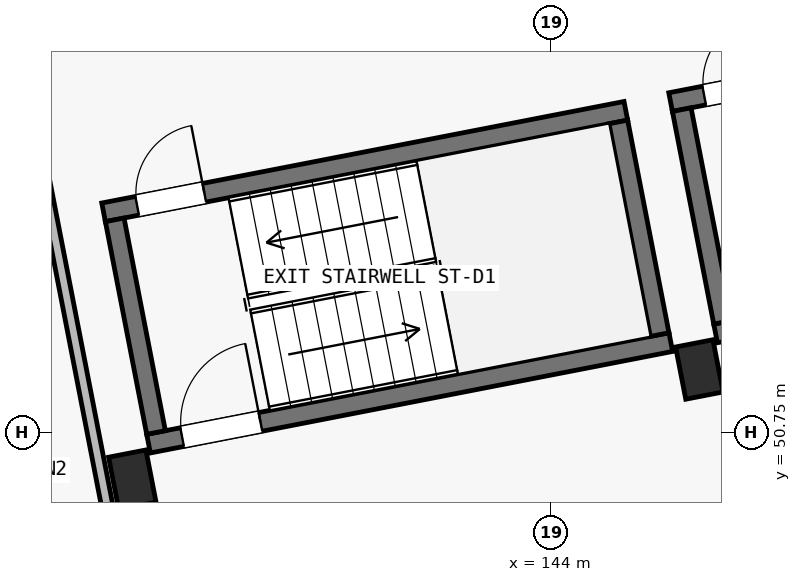
"""IFC4 building model, lengths in metres.
Left out: names, types, materials, properties, quantities, classifications, styles, units other than length and angle.
Written with IfcOpenShell. Run it as: python <this file> out.ifc"""

import sys

from ifc_helpers import new_model, si_unit, direction, frame, frame_2d, origin, origin_2d, place, context, subcontext, project, spatial, rectangle, extrude, element, fill, save


model = new_model("IFC4")
c1 = context("Model", 3, precision=1e-05, world=origin(), true_north=direction((0.0, 1.0)))
c2 = subcontext(c1, "Body", "Model", "MODEL_VIEW")
j1 = project(units=[si_unit("LENGTHUNIT", "METRE"), si_unit("PLANEANGLEUNIT", "RADIAN")], contexts=[c1])
p1 = place(None, origin())
s1 = spatial("IfcSite", under=j1, at=p1, CompositionType="ELEMENT")
p2 = place(p1, origin())
s2 = spatial("IfcBuilding", under=s1, at=p2, CompositionType="ELEMENT")
p3 = place(p2, frame((0.0, 0.0, 11.65)))
s3 = spatial("IfcBuildingStorey", under=s2, at=p3, CompositionType="ELEMENT", Elevation=11.65)
for number, where, z_axis, x_axis in (
    (1, (138.491, 50.13, 0.0), (0.0, 0.0, 1.0), (0.982, 0.191, 0.0)),
    (2, (145.952, 51.58, 0.0), (0.0, 0.0, 1.0), (0.982, 0.191, 0.0)),
):
    element("IfcColumn", number, at=place(p3, frame(where, z_axis=z_axis, x_axis=x_axis)), inside=s3, PredefinedType="COLUMN", context=c2, shape_type="SweptSolid", body=[
        extrude(rectangle(XDim=0.5, YDim=0.7, at=origin_2d()), origin(), (0.0, 0.0, 1.0), 3.25),
    ])
p4 = place(p3, frame((138.113, 53.647, 0.0), z_axis=(0.0, 0.0, 1.0), x_axis=(0.981626097708, 0.19081458094, 0.0)))
e3 = element("IfcWall", 3, at=p4, inside=s3, PredefinedType="SHEAR", context=c2, shape_type="SweptSolid", body=[
    extrude(rectangle(XDim=7.0, YDim=0.25, at=frame_2d((3.5, 0.0))), origin(), (0.0, 0.0, 1.0), 3.25),
])
p5 = place(p4, frame((0.45, 0.0, 0.0)))
e4 = element("IfcOpeningElement", 4, at=p5, cuts=e3, PredefinedType="OPENING", context=c2, shape_type="SweptSolid", body=[
    extrude(rectangle(XDim=0.9, YDim=2.1, at=frame_2d((0.45, 1.05))), frame((0.0, 0.14, 0.0), z_axis=(0.0, -1.0, 0.0), x_axis=(1.0, 0.0, 0.0)), (0.0, 0.0, 1.0), 0.28),
])
p6 = place(p3, frame((138.705, 50.604, 0.0), z_axis=(0.0, 0.0, 1.0), x_axis=(0.981626097708, 0.19081458094, 0.0)))
e5 = element("IfcWall", 5, at=p6, inside=s3, PredefinedType="SHEAR", context=c2, shape_type="SweptSolid", body=[
    extrude(rectangle(XDim=7.0, YDim=0.25, at=frame_2d((3.5, 0.0))), origin(), (0.0, 0.0, 1.0), 3.25),
])
p7 = place(p6, frame((0.45, 0.0, 0.0)))
e6 = element("IfcOpeningElement", 6, at=p7, cuts=e5, PredefinedType="OPENING", context=c2, shape_type="SweptSolid", body=[
    extrude(rectangle(XDim=1.05, YDim=2.15, at=frame_2d((0.525, 1.075))), frame((0.0, 0.14, 0.0), z_axis=(0.0, -1.0, 0.0), x_axis=(1.0, 0.0, 0.0)), (0.0, 0.0, 1.0), 0.28),
])
p8 = place(p3, frame((138.804, 50.751, 0.0), z_axis=(0.0, 0.0, 1.0), x_axis=(-0.190858194834, 0.981617618762, 0.0)))
e7 = element("IfcWall", 7, at=p8, inside=s3, PredefinedType="SHEAR", context=c2, shape_type="SweptSolid", body=[
    extrude(rectangle(XDim=2.85, YDim=0.25, at=frame_2d((1.425, 0.0))), origin(), (0.0, 0.0, 1.0), 3.25),
])
p9 = place(p3, frame((145.43, 52.039, 0.0), z_axis=(0.0, 0.0, 1.0), x_axis=(-0.190842147128, 0.981620738819, 0.0)))
e8 = element("IfcWall", 8, at=p9, inside=s3, PredefinedType="SHEAR", context=c2, shape_type="SweptSolid", body=[
    extrude(rectangle(XDim=2.85, YDim=0.25, at=frame_2d((1.425, 0.0))), origin(), (0.0, 0.0, 1.0), 3.25),
])
p10 = place(p3, frame((145.574, 55.098, 0.0), z_axis=(0.0, 0.0, 1.0), x_axis=(0.981626097708, 0.19081458094, 0.0)))
e9 = element("IfcWall", 9, at=p10, inside=s3, PredefinedType="SHEAR", context=c2, shape_type="SweptSolid", body=[
    extrude(rectangle(XDim=7.0, YDim=0.25, at=frame_2d((3.5, 0.0))), origin(), (0.0, 0.0, 1.0), 3.25),
])
p11 = place(p10, frame((0.45, 0.0, 0.0)))
e10 = element("IfcOpeningElement", 10, at=p11, cuts=e9, PredefinedType="OPENING", context=c2, shape_type="SweptSolid", body=[
    extrude(rectangle(XDim=0.9, YDim=2.1, at=frame_2d((0.45, 1.05))), frame((0.0, 0.14, 0.0), z_axis=(0.0, -1.0, 0.0), x_axis=(1.0, 0.0, 0.0)), (0.0, 0.0, 1.0), 0.28),
])
p12 = place(p3, frame((146.165, 52.054, 0.0), z_axis=(0.0, 0.0, 1.0), x_axis=(0.981627367538, 0.190808048312, 0.0)))
e11 = element("IfcWall", 11, at=p12, inside=s3, PredefinedType="SHEAR", context=c2, shape_type="SweptSolid", body=[
    extrude(rectangle(XDim=7.0, YDim=0.25, at=frame_2d((3.5, 0.0))), origin(), (0.0, 0.0, 1.0), 3.25),
])
p13 = place(p12, frame((0.45, 0.0, 0.0)))
e12 = element("IfcOpeningElement", 12, at=p13, cuts=e11, PredefinedType="OPENING", context=c2, shape_type="SweptSolid", body=[
    extrude(rectangle(XDim=1.05, YDim=2.15, at=frame_2d((0.525, 1.075))), frame((0.0, 0.14, 0.0), z_axis=(0.0, -1.0, 0.0), x_axis=(1.0, 0.0, 0.0)), (0.0, 0.0, 1.0), 0.28),
])
p14 = place(p3, frame((146.264, 52.201, 0.0), z_axis=(0.0, 0.0, 1.0), x_axis=(-0.190775649797, 0.981633664584, 0.0)))
e13 = element("IfcWall", 13, at=p14, inside=s3, PredefinedType="SHEAR", context=c2, shape_type="SweptSolid", body=[
    extrude(rectangle(XDim=2.85, YDim=0.25, at=frame_2d((1.425, 0.0))), origin(), (0.0, 0.0, 1.0), 3.25),
])
p15 = place(p3, frame((134.132, 52.644, 0.0), z_axis=(0.0, 0.0, 1.0), x_axis=(0.981629173664, 0.190798756314, 0.0)))
e14 = element("IfcWall", 14, at=p15, inside=s3, PredefinedType="PLUMBINGWALL", context=c2, shape_type="SweptSolid", body=[
    extrude(rectangle(XDim=3.41, YDim=0.165, at=frame_2d((1.705, 0.0))), origin(), (0.0, 0.0, 1.0), 2.97),
])
p16 = place(p15, frame((1.295, 0.0, 0.0)))
e15 = element("IfcOpeningElement", 15, at=p16, cuts=e14, PredefinedType="OPENING", context=c2, shape_type="SweptSolid", body=[
    extrude(rectangle(XDim=0.82, YDim=2.08, at=frame_2d((0.41, 1.04))), frame((0.0, 0.097, 0.0), z_axis=(0.0, -1.0, 0.0), x_axis=(1.0, 0.0, 0.0)), (0.0, 0.0, 1.0), 0.195),
])
p17 = place(p3, frame((138.467, 48.21, 0.0), z_axis=(0.0, 0.0, 1.0), x_axis=(-0.190814044018, 0.981626202078, 0.0)))
e16 = element("IfcWall", 16, at=p17, inside=s3, PredefinedType="PARTITIONING", context=c2, shape_type="SweptSolid", body=[
    extrude(rectangle(XDim=9.87, YDim=0.15, at=frame_2d((4.935, 0.0))), origin(), (0.0, 0.0, 1.0), 2.97),
])
p18 = place(p7, origin())
e17 = element("IfcDoor", 17, at=p18, inside=s3, OperationType="SINGLE_SWING_RIGHT", PredefinedType="DOOR", context=c2, shape_type="SweptSolid", body=[
    extrude(rectangle(XDim=1.05, YDim=2.15, at=frame_2d((0.525, 1.075))), frame((0.0, 0.025, 0.0), z_axis=(0.0, -1.0, 0.0), x_axis=(1.0, 0.0, 0.0)), (0.0, 0.0, 1.0), 0.05),
])
fill(e6, e17)
p19 = place(p5, origin())
e18 = element("IfcDoor", 18, at=p19, inside=s3, OperationType="SINGLE_SWING_RIGHT", PredefinedType="DOOR", context=c2, shape_type="SweptSolid", body=[
    extrude(rectangle(XDim=0.9, YDim=2.1, at=frame_2d((0.45, 1.05))), frame((0.0, 0.025, 0.0), z_axis=(0.0, -1.0, 0.0), x_axis=(1.0, 0.0, 0.0)), (0.0, 0.0, 1.0), 0.05),
])
fill(e4, e18)
p20 = place(p11, origin())
e19 = element("IfcDoor", 19, at=p20, inside=s3, OperationType="SINGLE_SWING_RIGHT", PredefinedType="DOOR", context=c2, shape_type="SweptSolid", body=[
    extrude(rectangle(XDim=0.9, YDim=2.1, at=frame_2d((0.45, 1.05))), frame((0.0, 0.025, 0.0), z_axis=(0.0, -1.0, 0.0), x_axis=(1.0, 0.0, 0.0)), (0.0, 0.0, 1.0), 0.05),
])
fill(e10, e19)
save(model, sys.argv[1])
